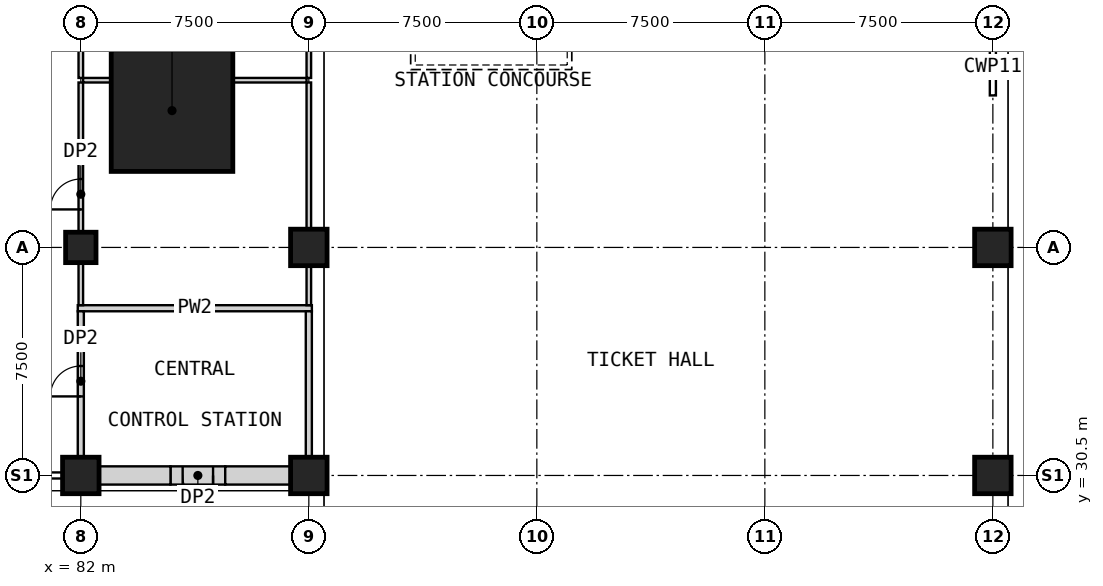
"""IFC4 building model, lengths in metres.
Left out: names, types, materials, properties, quantities, classifications, styles, units other than length and angle.
Written with IfcOpenShell. Run it as: python <this file> out.ifc"""

import sys

from ifc_helpers import new_model, si_unit, direction, frame, frame_2d, origin, origin_2d, place, context, subcontext, project, spatial, rectangle, extrude, element, fill, save


model = new_model("IFC4")
c1 = context("Model", 3, precision=1e-05, world=origin(), true_north=direction((0.0, 1.0)))
c2 = subcontext(c1, "Body", "Model", "MODEL_VIEW")
j1 = project(units=[si_unit("LENGTHUNIT", "METRE"), si_unit("PLANEANGLEUNIT", "RADIAN")], contexts=[c1])
p1 = place(None, origin())
s1 = spatial("IfcSite", under=j1, at=p1, CompositionType="ELEMENT")
p2 = place(p1, origin())
s2 = spatial("IfcBuilding", under=s1, at=p2, CompositionType="ELEMENT")
p3 = place(p2, origin())
s3 = spatial("IfcBuildingStorey", under=s2, at=p3, CompositionType="ELEMENT", Elevation=0.0)
p4 = place(p3, frame((82.0, 38.0, 0.0), z_axis=(0.0, 0.0, 1.0), x_axis=(1.0, 0.0, 0.0)))
e1 = element("IfcColumn", 1, at=p4, inside=s3, PredefinedType="COLUMN", context=c2, shape_type="SweptSolid", body=[
    extrude(rectangle(XDim=1.0, YDim=1.0, at=origin_2d()), origin(), (0.0, 0.0, 1.0), 8.0),
])
p5 = place(p3, frame((85.0, 42.5, 0.0), z_axis=(0.0, 0.0, 1.0), x_axis=(1.0, 0.0, 0.0)))
e2 = element("IfcColumn", 2, at=p5, inside=s3, PredefinedType="COLUMN", context=c2, shape_type="SweptSolid", body=[
    extrude(rectangle(XDim=4.0, YDim=4.0, at=origin_2d()), origin(), (0.0, 0.0, 1.0), 8.0),
])
for number, where, z_axis, x_axis in (
    (3, (82.0, 30.5, 0.0), (0.0, 0.0, 1.0), (1.0, 0.0, 0.0)),
    (4, (89.5, 30.5, 0.0), (0.0, 0.0, 1.0), (1.0, 0.0, 0.0)),
    (5, (89.5, 38.0, 0.0), (0.0, 0.0, 1.0), (1.0, 0.0, 0.0)),
    (6, (112.0, 30.5, 0.0), (0.0, 0.0, 1.0), (1.0, 0.0, 0.0)),
    (7, (112.0, 38.0, 0.0), (0.0, 0.0, 1.0), (1.0, 0.0, 0.0)),
):
    element("IfcColumn", number, at=place(p3, frame(where, z_axis=z_axis, x_axis=x_axis)), inside=s3, PredefinedType="COLUMN", context=c2, shape_type="SweptSolid", body=[
        extrude(rectangle(XDim=1.2, YDim=1.2, at=origin_2d()), origin(), (0.0, 0.0, 1.0), 8.0),
    ])
p6 = place(p3, frame((86.75, 30.5, 0.0), z_axis=(0.0, 0.0, 1.0), x_axis=(-1.0, 0.0, 0.0)))
e8 = element("IfcWall", 8, at=p6, inside=s3, PredefinedType="PARTITIONING", context=c2, shape_type="SweptSolid", body=[
    extrude(rectangle(XDim=1.8, YDim=0.6, at=frame_2d((0.9, 0.0))), origin(), (0.0, 0.0, 1.0), 7.1),
])
p7 = place(p6, frame((0.4, 0.0, 0.0)))
e9 = element("IfcOpeningElement", 9, at=p7, cuts=e8, PredefinedType="OPENING", context=c2, shape_type="SweptSolid", body=[
    extrude(rectangle(XDim=1.0, YDim=2.1, at=frame_2d((0.5, 1.05))), frame((0.0, 0.31, 0.0), z_axis=(0.0, -1.0, 0.0), x_axis=(1.0, 0.0, 0.0)), (0.0, 0.0, 1.0), 0.62),
])
p8 = place(p3, frame((82.6, 30.5, 0.0), z_axis=(0.0, 0.0, 1.0), x_axis=(1.0, 0.0, 0.0)))
e10 = element("IfcWall", 10, at=p8, inside=s3, PredefinedType="PARTITIONING", context=c2, shape_type="SweptSolid", body=[
    extrude(rectangle(XDim=2.35, YDim=0.6, at=frame_2d((1.175, 0.0))), origin(), (0.0, 0.0, 1.0), 7.1),
])
p9 = place(p3, frame((86.75, 30.5, 0.0), z_axis=(0.0, 0.0, 1.0), x_axis=(1.0, 0.0, 0.0)))
e11 = element("IfcWall", 11, at=p9, inside=s3, PredefinedType="PARTITIONING", context=c2, shape_type="SweptSolid", body=[
    extrude(rectangle(XDim=2.15, YDim=0.6, at=frame_2d((1.075, 0.0))), origin(), (0.0, 0.0, 1.0), 7.1),
])
p10 = place(p3, frame((81.9, 36.0, 0.0), z_axis=(0.0, 0.0, 1.0), x_axis=(1.0, 0.0, 0.0)))
e12 = element("IfcWall", 12, at=p10, inside=s3, PredefinedType="PARTITIONING", context=c2, shape_type="SweptSolid", body=[
    extrude(rectangle(XDim=7.7, YDim=0.2, at=frame_2d((3.85, 0.0))), origin(), (0.0, 0.0, 1.0), 7.7),
])
p11 = place(p3, frame((82.075, 43.5, 0.0), z_axis=(0.0, 0.0, 1.0), x_axis=(1.0, 0.0, 0.0)))
e13 = element("IfcWall", 13, at=p11, inside=s3, PredefinedType="PARTITIONING", context=c2, shape_type="SweptSolid", body=[
    extrude(rectangle(XDim=0.925, YDim=0.15, at=frame_2d((0.462, 0.0))), origin(), (0.0, 0.0, 1.0), 7.7),
])
p12 = place(p3, frame((87.0, 43.5, 0.0), z_axis=(0.0, 0.0, 1.0), x_axis=(1.0, 0.0, 0.0)))
e14 = element("IfcWall", 14, at=p12, inside=s3, PredefinedType="PARTITIONING", context=c2, shape_type="SweptSolid", body=[
    extrude(rectangle(XDim=2.425, YDim=0.15, at=frame_2d((1.212, 0.0))), origin(), (0.0, 0.0, 1.0), 7.7),
])
p13 = place(p3, frame((89.5, 31.1, 0.0), z_axis=(0.0, 0.0, 1.0), x_axis=(0.0, 1.0, 0.0)))
e15 = element("IfcWall", 15, at=p13, inside=s3, PredefinedType="PARTITIONING", context=c2, shape_type="SweptSolid", body=[
    extrude(rectangle(XDim=4.8, YDim=0.2, at=frame_2d((2.4, 0.0))), origin(), (0.0, 0.0, 1.0), 7.7),
])
p14 = place(p3, frame((89.5, 36.1, 0.0), z_axis=(0.0, 0.0, 1.0), x_axis=(0.0, 1.0, 0.0)))
e16 = element("IfcWall", 16, at=p14, inside=s3, PredefinedType="PARTITIONING", context=c2, shape_type="SweptSolid", body=[
    extrude(rectangle(XDim=1.3, YDim=0.15, at=frame_2d((0.65, 0.0))), origin(), (0.0, 0.0, 1.0), 7.7),
])
p15 = place(p3, frame((89.5, 38.6, 0.0), z_axis=(0.0, 0.0, 1.0), x_axis=(0.0, 1.0, 0.0)))
e17 = element("IfcWall", 17, at=p15, inside=s3, PredefinedType="PARTITIONING", context=c2, shape_type="SweptSolid", body=[
    extrude(rectangle(XDim=4.825, YDim=0.15, at=frame_2d((2.413, 0.0))), origin(), (0.0, 0.0, 1.0), 7.7),
])
p16 = place(p3, frame((89.5, 43.575, 0.0), z_axis=(0.0, 0.0, 1.0), x_axis=(0.0, 1.0, 0.0)))
e18 = element("IfcWall", 18, at=p16, inside=s3, PredefinedType="PARTITIONING", context=c2, shape_type="SweptSolid", body=[
    extrude(rectangle(XDim=1.425, YDim=0.15, at=frame_2d((0.712, 0.0))), origin(), (0.0, 0.0, 1.0), 7.7),
])
p17 = place(p3, frame((82.0, 31.1, 0.0), z_axis=(0.0, 0.0, 1.0), x_axis=(0.0, 1.0, 0.0)))
e19 = element("IfcWall", 19, at=p17, inside=s3, PredefinedType="PARTITIONING", context=c2, shape_type="SweptSolid", body=[
    extrude(rectangle(XDim=4.8, YDim=0.2, at=frame_2d((2.4, 0.0))), origin(), (0.0, 0.0, 1.0), 7.7),
])
p18 = place(p17, frame((2.0, 0.0, 0.0)))
e20 = element("IfcOpeningElement", 20, at=p18, cuts=e19, PredefinedType="OPENING", context=c2, shape_type="SweptSolid", body=[
    extrude(rectangle(XDim=1.0, YDim=2.1, at=frame_2d((0.5, 1.05))), frame((0.0, 0.11, 0.0), z_axis=(0.0, -1.0, 0.0), x_axis=(1.0, 0.0, 0.0)), (0.0, 0.0, 1.0), 0.22),
])
p19 = place(p3, frame((82.0, 36.1, 0.0), z_axis=(0.0, 0.0, 1.0), x_axis=(0.0, 1.0, 0.0)))
e21 = element("IfcWall", 21, at=p19, inside=s3, PredefinedType="PARTITIONING", context=c2, shape_type="SweptSolid", body=[
    extrude(rectangle(XDim=1.4, YDim=0.15, at=frame_2d((0.7, 0.0))), origin(), (0.0, 0.0, 1.0), 7.7),
])
p20 = place(p3, frame((82.0, 38.5, 0.0), z_axis=(0.0, 0.0, 1.0), x_axis=(0.0, 1.0, 0.0)))
e22 = element("IfcWall", 22, at=p20, inside=s3, PredefinedType="PARTITIONING", context=c2, shape_type="SweptSolid", body=[
    extrude(rectangle(XDim=4.925, YDim=0.15, at=frame_2d((2.462, 0.0))), origin(), (0.0, 0.0, 1.0), 7.7),
])
p21 = place(p20, frame((0.75, 0.0, 0.0)))
e23 = element("IfcOpeningElement", 23, at=p21, cuts=e22, PredefinedType="OPENING", context=c2, shape_type="SweptSolid", body=[
    extrude(rectangle(XDim=1.0, YDim=2.1, at=frame_2d((0.5, 1.05))), frame((0.0, 0.085, 0.0), z_axis=(0.0, -1.0, 0.0), x_axis=(1.0, 0.0, 0.0)), (0.0, 0.0, 1.0), 0.17),
])
p22 = place(p3, frame((82.0, 43.575, 0.0), z_axis=(0.0, 0.0, 1.0), x_axis=(0.0, 1.0, 0.0)))
e24 = element("IfcWall", 24, at=p22, inside=s3, PredefinedType="PARTITIONING", context=c2, shape_type="SweptSolid", body=[
    extrude(rectangle(XDim=1.325, YDim=0.15, at=frame_2d((0.663, 0.0))), origin(), (0.0, 0.0, 1.0), 7.7),
])
p23 = place(p7, origin())
e25 = element("IfcDoor", 25, at=p23, inside=s3, OperationType="SINGLE_SWING_LEFT", PredefinedType="DOOR", context=c2, shape_type="SweptSolid", body=[
    extrude(rectangle(XDim=1.0, YDim=2.1, at=frame_2d((0.5, 1.05))), frame((0.0, 0.025, 0.0), z_axis=(0.0, -1.0, 0.0), x_axis=(1.0, 0.0, 0.0)), (0.0, 0.0, 1.0), 0.05),
])
fill(e9, e25)
p24 = place(p18, origin())
e26 = element("IfcDoor", 26, at=p24, inside=s3, OperationType="SINGLE_SWING_LEFT", PredefinedType="DOOR", context=c2, shape_type="SweptSolid", body=[
    extrude(rectangle(XDim=1.0, YDim=2.1, at=frame_2d((0.5, 1.05))), frame((0.0, 0.025, 0.0), z_axis=(0.0, -1.0, 0.0), x_axis=(1.0, 0.0, 0.0)), (0.0, 0.0, 1.0), 0.05),
])
fill(e20, e26)
p25 = place(p21, origin())
e27 = element("IfcDoor", 27, at=p25, inside=s3, OperationType="SINGLE_SWING_LEFT", PredefinedType="DOOR", context=c2, shape_type="SweptSolid", body=[
    extrude(rectangle(XDim=1.0, YDim=2.1, at=frame_2d((0.5, 1.05))), frame((0.0, 0.025, 0.0), z_axis=(0.0, -1.0, 0.0), x_axis=(1.0, 0.0, 0.0)), (0.0, 0.0, 1.0), 0.05),
])
fill(e23, e27)
save(model, sys.argv[1])
